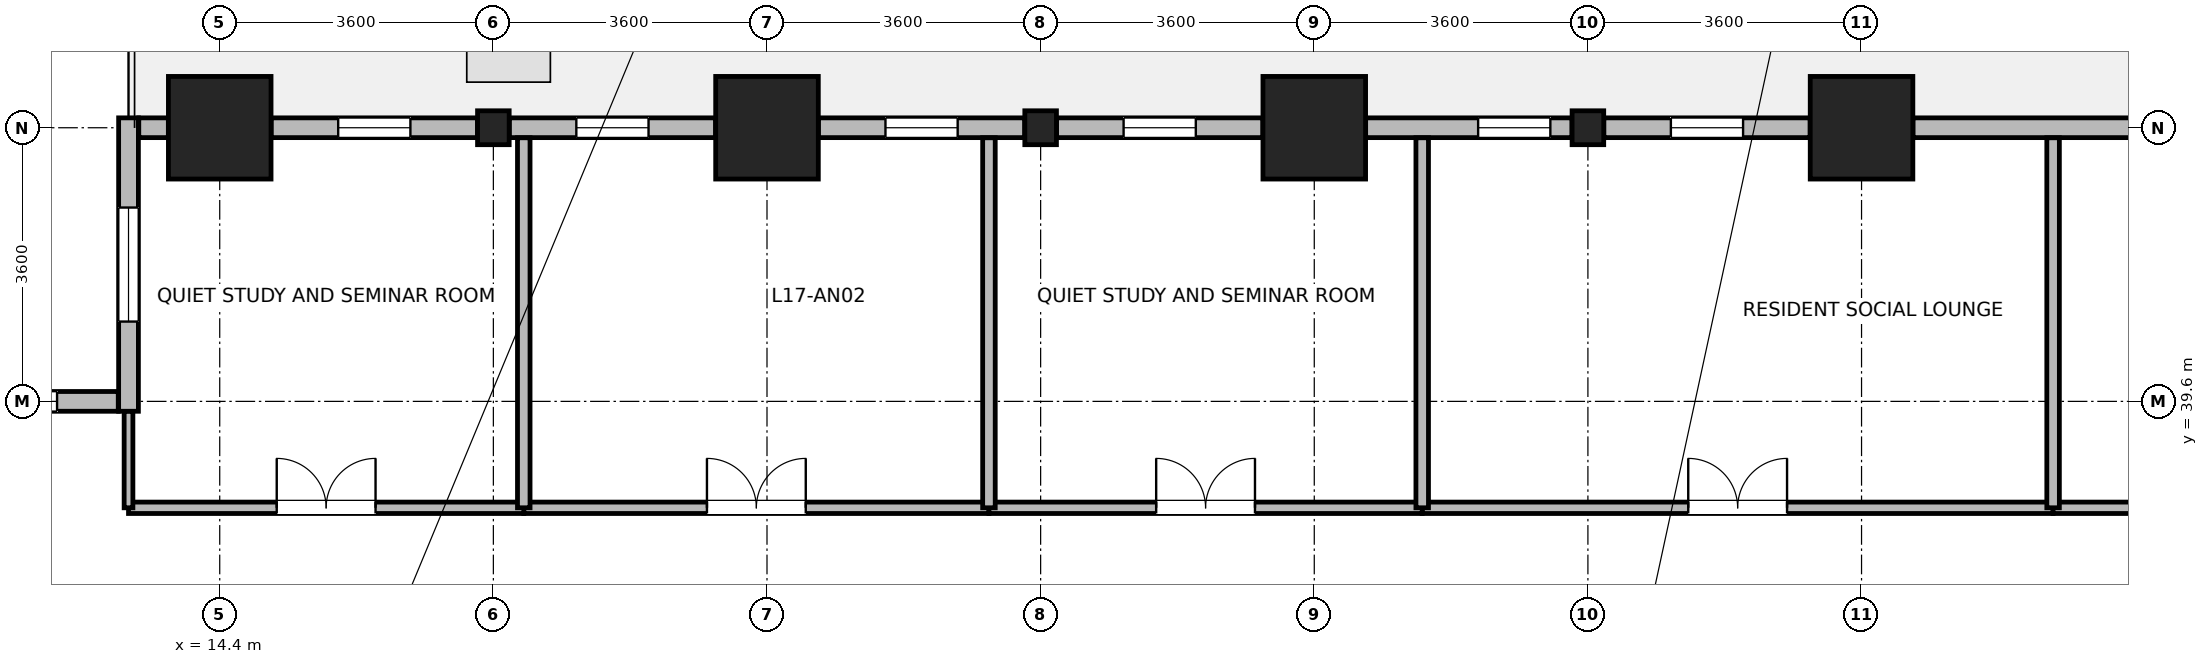
"""IFC4 building model, lengths in metres.
Left out: names, types, materials, properties, quantities, classifications, styles, units other than length and angle.
Written with IfcOpenShell. Run it as: python <this file> out.ifc"""

import sys

from ifc_helpers import new_model, si_unit, direction, frame, frame_2d, origin, origin_2d, place, context, subcontext, project, spatial, rectangle, i_section, extrude, source, transform, mapped, element, fill, save


model = new_model("IFC4")
c1 = context("Model", 3, precision=1e-05, world=origin(), true_north=direction((0.0, 1.0)))
c2 = subcontext(c1, "Body", "Model", "MODEL_VIEW")
j1 = project(units=[si_unit("LENGTHUNIT", "METRE"), si_unit("PLANEANGLEUNIT", "RADIAN")], contexts=[c1])
p1 = place(None, origin())
s1 = spatial("IfcSite", under=j1, at=p1, CompositionType="ELEMENT")
p2 = place(p1, origin())
s2 = spatial("IfcBuilding", under=s1, at=p2, CompositionType="ELEMENT")
p3 = place(p2, frame((0.0, 0.0, 69.7)))
s3 = spatial("IfcBuildingStorey", under=s2, at=p3, CompositionType="ELEMENT", Elevation=69.7)
m1 = source(origin(), c2, "Body", "SweptSolid", [
    extrude(rectangle(XDim=1.35, YDim=1.35, at=origin_2d()), origin(), (0.0, 0.0, 1.0), 3.7),
])
for number, where, z_axis, x_axis in (
    (1, (14.4, 43.2, 0.0), (0.0, 0.0, 1.0), (1.0, 0.0, 0.0)),
    (2, (21.6, 43.2, 0.0), (0.0, 0.0, 1.0), (1.0, 0.0, 0.0)),
    (3, (28.8, 43.2, 0.0), (0.0, 0.0, 1.0), (1.0, 0.0, 0.0)),
    (4, (36.0, 43.2, 0.0), (0.0, 0.0, 1.0), (1.0, 0.0, 0.0)),
):
    element("IfcColumn", number, at=place(p3, frame(where, z_axis=z_axis, x_axis=x_axis)), inside=s3, PredefinedType="COLUMN", context=c2, shape_type="MappedRepresentation", body=[
        mapped(m1, transform((0.0, 0.0, 0.0), x_axis=(1.0, 0.0, 0.0), y_axis=(0.0, 1.0, 0.0), z_axis=(0.0, 0.0, 1.0), scale=1.0)),
    ])
m2 = source(origin(), c2, "Body", "SweptSolid", [
    extrude(i_section(OverallWidth=0.416, OverallDepth=0.446, WebThickness=0.029, FlangeThickness=0.04, FilletRadius=0.015, at=origin_2d()), origin(), (0.0, 0.0, 1.0), 3.7),
])
for number, where, z_axis, x_axis in (
    (5, (18.0, 43.2, 0.0), (0.0, 0.0, 1.0), (1.0, 0.0, 0.0)),
    (6, (25.2, 43.2, 0.0), (0.0, 0.0, 1.0), (1.0, 0.0, 0.0)),
    (7, (32.4, 43.2, 0.0), (0.0, 0.0, 1.0), (1.0, 0.0, 0.0)),
):
    element("IfcColumn", number, at=place(p3, frame(where, z_axis=z_axis, x_axis=x_axis)), inside=s3, PredefinedType="COLUMN", context=c2, shape_type="MappedRepresentation", body=[
        mapped(m2, transform((0.0, 0.0, 0.0), x_axis=(1.0, 0.0, 0.0), y_axis=(0.0, 1.0, 0.0), z_axis=(0.0, 0.0, 1.0), scale=1.0)),
    ])
p4 = place(p3, frame((36.676, 43.2, 0.0), z_axis=(0.0, 0.0, 1.0), x_axis=(1.0, 0.0, 0.0)))
e8 = element("IfcWall", 8, at=p4, inside=s3, PredefinedType="STANDARD", context=c2, shape_type="SweptSolid", body=[
    extrude(rectangle(XDim=9.448, YDim=0.26, at=frame_2d((4.724, 0.0))), origin(), (0.0, 0.0, 1.0), 2.82),
])
p5 = place(p4, frame((3.974, 0.0, 0.0)))
e9 = element("IfcOpeningElement", 9, at=p5, cuts=e8, PredefinedType="OPENING", context=c2, shape_type="SweptSolid", body=[
    extrude(rectangle(XDim=1.5, YDim=2.15, at=frame_2d((0.75, 1.075))), frame((0.0, 0.14, 0.0), z_axis=(0.0, -1.0, 0.0), x_axis=(1.0, 0.0, 0.0)), (0.0, 0.0, 1.0), 0.28),
])
p6 = place(p4, frame((7.123, 0.0, 0.85)))
e10 = element("IfcOpeningElement", 10, at=p6, cuts=e8, PredefinedType="OPENING", context=c2, shape_type="SweptSolid", body=[
    extrude(rectangle(XDim=1.5, YDim=1.85, at=frame_2d((0.75, 0.925))), frame((0.0, 0.14, 0.0), z_axis=(0.0, -1.0, 0.0), x_axis=(1.0, 0.0, 0.0)), (0.0, 0.0, 1.0), 0.28),
])
p7 = place(p3, frame((32.609, 43.2, 0.0), z_axis=(0.0, 0.0, 1.0), x_axis=(1.0, 0.0, 0.0)))
e11 = element("IfcWall", 11, at=p7, inside=s3, PredefinedType="STANDARD", context=c2, shape_type="SweptSolid", body=[
    extrude(rectangle(XDim=2.715, YDim=0.26, at=frame_2d((1.357, 0.0))), origin(), (0.0, 0.0, 1.0), 2.82),
])
p8 = place(p7, frame((0.883, 0.0, 0.85)))
e12 = element("IfcOpeningElement", 12, at=p8, cuts=e11, PredefinedType="OPENING", context=c2, shape_type="SweptSolid", body=[
    extrude(rectangle(XDim=0.95, YDim=1.75, at=frame_2d((0.475, 0.875))), frame((0.0, 0.14, 0.0), z_axis=(0.0, -1.0, 0.0), x_axis=(1.0, 0.0, 0.0)), (0.0, 0.0, 1.0), 0.28),
])
p9 = place(p3, frame((29.476, 43.2, 0.0), z_axis=(0.0, 0.0, 1.0), x_axis=(1.0, 0.0, 0.0)))
e13 = element("IfcWall", 13, at=p9, inside=s3, PredefinedType="STANDARD", context=c2, shape_type="SweptSolid", body=[
    extrude(rectangle(XDim=2.715, YDim=0.26, at=frame_2d((1.357, 0.0))), origin(), (0.0, 0.0, 1.0), 2.82),
])
p10 = place(p9, frame((1.48, 0.0, 0.85)))
e14 = element("IfcOpeningElement", 14, at=p10, cuts=e13, PredefinedType="OPENING", context=c2, shape_type="SweptSolid", body=[
    extrude(rectangle(XDim=0.95, YDim=1.75, at=frame_2d((0.475, 0.875))), frame((0.0, 0.14, 0.0), z_axis=(0.0, -1.0, 0.0), x_axis=(1.0, 0.0, 0.0)), (0.0, 0.0, 1.0), 0.28),
])
p11 = place(p3, frame((25.409, 43.2, 0.0), z_axis=(0.0, 0.0, 1.0), x_axis=(1.0, 0.0, 0.0)))
e15 = element("IfcWall", 15, at=p11, inside=s3, PredefinedType="STANDARD", context=c2, shape_type="SweptSolid", body=[
    extrude(rectangle(XDim=2.715, YDim=0.26, at=frame_2d((1.357, 0.0))), origin(), (0.0, 0.0, 1.0), 2.82),
])
p12 = place(p11, frame((0.883, 0.0, 0.85)))
e16 = element("IfcOpeningElement", 16, at=p12, cuts=e15, PredefinedType="OPENING", context=c2, shape_type="SweptSolid", body=[
    extrude(rectangle(XDim=0.95, YDim=1.75, at=frame_2d((0.475, 0.875))), frame((0.0, 0.14, 0.0), z_axis=(0.0, -1.0, 0.0), x_axis=(1.0, 0.0, 0.0)), (0.0, 0.0, 1.0), 0.28),
])
p13 = place(p3, frame((22.276, 43.2, 0.0), z_axis=(0.0, 0.0, 1.0), x_axis=(1.0, 0.0, 0.0)))
e17 = element("IfcWall", 17, at=p13, inside=s3, PredefinedType="STANDARD", context=c2, shape_type="SweptSolid", body=[
    extrude(rectangle(XDim=2.715, YDim=0.26, at=frame_2d((1.357, 0.0))), origin(), (0.0, 0.0, 1.0), 2.82),
])
p14 = place(p13, frame((0.883, 0.0, 0.85)))
e18 = element("IfcOpeningElement", 18, at=p14, cuts=e17, PredefinedType="OPENING", context=c2, shape_type="SweptSolid", body=[
    extrude(rectangle(XDim=0.95, YDim=1.75, at=frame_2d((0.475, 0.875))), frame((0.0, 0.14, 0.0), z_axis=(0.0, -1.0, 0.0), x_axis=(1.0, 0.0, 0.0)), (0.0, 0.0, 1.0), 0.28),
])
p15 = place(p3, frame((18.209, 43.2, 0.0), z_axis=(0.0, 0.0, 1.0), x_axis=(1.0, 0.0, 0.0)))
e19 = element("IfcWall", 19, at=p15, inside=s3, PredefinedType="STANDARD", context=c2, shape_type="SweptSolid", body=[
    extrude(rectangle(XDim=2.715, YDim=0.26, at=frame_2d((1.357, 0.0))), origin(), (0.0, 0.0, 1.0), 2.82),
])
p16 = place(p15, frame((0.883, 0.0, 0.85)))
e20 = element("IfcOpeningElement", 20, at=p16, cuts=e19, PredefinedType="OPENING", context=c2, shape_type="SweptSolid", body=[
    extrude(rectangle(XDim=0.95, YDim=1.75, at=frame_2d((0.475, 0.875))), frame((0.0, 0.14, 0.0), z_axis=(0.0, -1.0, 0.0), x_axis=(1.0, 0.0, 0.0)), (0.0, 0.0, 1.0), 0.28),
])
p17 = place(p3, frame((15.076, 43.2, 0.0), z_axis=(0.0, 0.0, 1.0), x_axis=(1.0, 0.0, 0.0)))
e21 = element("IfcWall", 21, at=p17, inside=s3, PredefinedType="STANDARD", context=c2, shape_type="SweptSolid", body=[
    extrude(rectangle(XDim=2.715, YDim=0.26, at=frame_2d((1.357, 0.0))), origin(), (0.0, 0.0, 1.0), 2.82),
])
p18 = place(p17, frame((0.883, 0.0, 0.85)))
e22 = element("IfcOpeningElement", 22, at=p18, cuts=e21, PredefinedType="OPENING", context=c2, shape_type="SweptSolid", body=[
    extrude(rectangle(XDim=0.95, YDim=1.75, at=frame_2d((0.475, 0.875))), frame((0.0, 0.14, 0.0), z_axis=(0.0, -1.0, 0.0), x_axis=(1.0, 0.0, 0.0)), (0.0, 0.0, 1.0), 0.28),
])
p19 = place(p3, frame((13.335, 43.2, 0.0), z_axis=(0.0, 0.0, 1.0), x_axis=(1.0, 0.0, 0.0)))
e23 = element("IfcWall", 23, at=p19, inside=s3, PredefinedType="STANDARD", context=c2, shape_type="SweptSolid", body=[
    extrude(rectangle(XDim=0.389, YDim=0.26, at=frame_2d((0.195, 0.0))), origin(), (0.0, 0.0, 1.0), 3.32),
])
p20 = place(p3, frame((13.2, 39.47, 0.0), z_axis=(0.0, 0.0, 1.0), x_axis=(0.0, 1.0, 0.0)))
e24 = element("IfcWall", 24, at=p20, inside=s3, PredefinedType="STANDARD", context=c2, shape_type="SweptSolid", body=[
    extrude(rectangle(XDim=3.86, YDim=0.26, at=frame_2d((1.93, 0.0))), origin(), (0.0, 0.0, 1.0), 3.32),
])
p21 = place(p20, frame((1.18, 0.0, 0.85)))
e25 = element("IfcOpeningElement", 25, at=p21, cuts=e24, PredefinedType="OPENING", context=c2, shape_type="SweptSolid", body=[
    extrude(rectangle(XDim=1.5, YDim=1.85, at=frame_2d((0.75, 0.925))), frame((0.0, 0.14, 0.0), z_axis=(0.0, -1.0, 0.0), x_axis=(1.0, 0.0, 0.0)), (0.0, 0.0, 1.0), 0.28),
])
p22 = place(p3, frame((3.735, 39.6, 0.0), z_axis=(0.0, 0.0, 1.0), x_axis=(1.0, 0.0, 0.0)))
e26 = element("IfcWall", 26, at=p22, inside=s3, PredefinedType="STANDARD", context=c2, shape_type="SweptSolid", body=[
    extrude(rectangle(XDim=9.33, YDim=0.26, at=frame_2d((4.665, 0.0))), origin(), (0.0, 0.0, 1.0), 3.32),
])
p23 = place(p22, frame((0.805, 0.0, 0.85)))
e27 = element("IfcOpeningElement", 27, at=p23, cuts=e26, PredefinedType="OPENING", context=c2, shape_type="SweptSolid", body=[
    extrude(rectangle(XDim=1.5, YDim=1.85, at=frame_2d((0.75, 0.925))), frame((0.0, 0.14, 0.0), z_axis=(0.0, -1.0, 0.0), x_axis=(1.0, 0.0, 0.0)), (0.0, 0.0, 1.0), 0.28),
])
p24 = place(p22, frame((3.915, 0.0, 0.85)))
e28 = element("IfcOpeningElement", 28, at=p24, cuts=e26, PredefinedType="OPENING", context=c2, shape_type="SweptSolid", body=[
    extrude(rectangle(XDim=1.5, YDim=1.85, at=frame_2d((0.75, 0.925))), frame((0.0, 0.14, 0.0), z_axis=(0.0, -1.0, 0.0), x_axis=(1.0, 0.0, 0.0)), (0.0, 0.0, 1.0), 0.28),
])
p25 = place(p22, frame((7.025, 0.0, 0.85)))
e29 = element("IfcOpeningElement", 29, at=p25, cuts=e26, PredefinedType="OPENING", context=c2, shape_type="SweptSolid", body=[
    extrude(rectangle(XDim=1.5, YDim=1.85, at=frame_2d((0.75, 0.925))), frame((0.0, 0.14, 0.0), z_axis=(0.0, -1.0, 0.0), x_axis=(1.0, 0.0, 0.0)), (0.0, 0.0, 1.0), 0.28),
])
p26 = place(p3, frame((30.22, 38.2, 0.0), z_axis=(0.0, 0.0, 1.0), x_axis=(1.0, 0.0, 0.0)))
e30 = element("IfcWall", 30, at=p26, inside=s3, PredefinedType="PARTITIONING", context=c2, shape_type="SweptSolid", body=[
    extrude(rectangle(XDim=8.3, YDim=0.15, at=frame_2d((4.15, 0.0))), origin(), (0.0, 0.0, 1.0), 3.32),
])
p27 = place(p26, frame((3.5, 0.0, 0.0)))
e31 = element("IfcOpeningElement", 31, at=p27, cuts=e30, PredefinedType="OPENING", context=c2, shape_type="SweptSolid", body=[
    extrude(rectangle(XDim=1.3, YDim=2.12, at=frame_2d((0.65, 1.06))), frame((0.0, 0.085, 0.0), z_axis=(0.0, -1.0, 0.0), x_axis=(1.0, 0.0, 0.0)), (0.0, 0.0, 1.0), 0.17),
])
p28 = place(p3, frame((38.52, 38.2, 0.0), z_axis=(0.0, 0.0, 1.0), x_axis=(1.0, 0.0, 0.0)))
e32 = element("IfcWall", 32, at=p28, inside=s3, PredefinedType="PARTITIONING", context=c2, shape_type="SweptSolid", body=[
    extrude(rectangle(XDim=7.64, YDim=0.15, at=frame_2d((3.82, 0.0))), origin(), (0.0, 0.0, 1.0), 3.32),
])
p29 = place(p28, frame((3.37, 0.0, 0.0)))
e33 = element("IfcOpeningElement", 33, at=p29, cuts=e32, PredefinedType="OPENING", context=c2, shape_type="SweptSolid", body=[
    extrude(rectangle(XDim=0.9, YDim=2.08, at=frame_2d((0.45, 1.04))), frame((0.0, 0.085, 0.0), z_axis=(0.0, -1.0, 0.0), x_axis=(1.0, 0.0, 0.0)), (0.0, 0.0, 1.0), 0.17),
])
p30 = place(p3, frame((18.4, 38.2, 0.0), z_axis=(0.0, 0.0, 1.0), x_axis=(1.0, 0.0, 0.0)))
e34 = element("IfcWall", 34, at=p30, inside=s3, PredefinedType="PARTITIONING", context=c2, shape_type="SweptSolid", body=[
    extrude(rectangle(XDim=6.12, YDim=0.15, at=frame_2d((3.06, 0.0))), origin(), (0.0, 0.0, 1.0), 3.32),
])
p31 = place(p30, frame((2.41, 0.0, 0.0)))
e35 = element("IfcOpeningElement", 35, at=p31, cuts=e34, PredefinedType="OPENING", context=c2, shape_type="SweptSolid", body=[
    extrude(rectangle(XDim=1.3, YDim=2.12, at=frame_2d((0.65, 1.06))), frame((0.0, 0.085, 0.0), z_axis=(0.0, -1.0, 0.0), x_axis=(1.0, 0.0, 0.0)), (0.0, 0.0, 1.0), 0.17),
])
p32 = place(p3, frame((24.52, 38.2, 0.0), z_axis=(0.0, 0.0, 1.0), x_axis=(1.0, 0.0, 0.0)))
e36 = element("IfcWall", 36, at=p32, inside=s3, PredefinedType="PARTITIONING", context=c2, shape_type="SweptSolid", body=[
    extrude(rectangle(XDim=5.7, YDim=0.15, at=frame_2d((2.85, 0.0))), origin(), (0.0, 0.0, 1.0), 3.32),
])
p33 = place(p32, frame((2.2, 0.0, 0.0)))
e37 = element("IfcOpeningElement", 37, at=p33, cuts=e36, PredefinedType="OPENING", context=c2, shape_type="SweptSolid", body=[
    extrude(rectangle(XDim=1.3, YDim=2.12, at=frame_2d((0.65, 1.06))), frame((0.0, 0.085, 0.0), z_axis=(0.0, -1.0, 0.0), x_axis=(1.0, 0.0, 0.0)), (0.0, 0.0, 1.0), 0.17),
])
p34 = place(p3, frame((13.2, 38.2, 0.0), z_axis=(0.0, 0.0, 1.0), x_axis=(1.0, 0.0, 0.0)))
e38 = element("IfcWall", 38, at=p34, inside=s3, PredefinedType="PARTITIONING", context=c2, shape_type="SweptSolid", body=[
    extrude(rectangle(XDim=5.2, YDim=0.15, at=frame_2d((2.6, 0.0))), origin(), (0.0, 0.0, 1.0), 3.32),
])
p35 = place(p34, frame((1.95, 0.0, 0.0)))
e39 = element("IfcOpeningElement", 39, at=p35, cuts=e38, PredefinedType="OPENING", context=c2, shape_type="SweptSolid", body=[
    extrude(rectangle(XDim=1.3, YDim=2.12, at=frame_2d((0.65, 1.06))), frame((0.0, 0.085, 0.0), z_axis=(0.0, -1.0, 0.0), x_axis=(1.0, 0.0, 0.0)), (0.0, 0.0, 1.0), 0.17),
])
p36 = place(p3, frame((13.2, 38.2, 0.0), z_axis=(0.0, 0.0, 1.0), x_axis=(0.0, 1.0, 0.0)))
e40 = element("IfcWall", 40, at=p36, inside=s3, PredefinedType="PARTITIONING", context=c2, shape_type="SweptSolid", body=[
    extrude(rectangle(XDim=1.268, YDim=0.115, at=frame_2d((0.634, 0.0))), origin(), (0.0, 0.0, 1.0), 3.32),
])
for number, where, z_axis, x_axis in (
    (41, (18.4, 38.2, 0.0), (0.0, 0.0, 1.0), (0.0, 1.0, 0.0)),
    (42, (24.52, 38.2, 0.0), (0.0, 0.0, 1.0), (0.0, 1.0, 0.0)),
    (43, (30.22, 38.2, 0.0), (0.0, 0.0, 1.0), (0.0, 1.0, 0.0)),
    (44, (38.52, 38.2, 0.0), (0.0, 0.0, 1.0), (0.0, 1.0, 0.0)),
):
    element("IfcWall", number, at=place(p3, frame(where, z_axis=z_axis, x_axis=x_axis)), inside=s3, PredefinedType="PARTITIONING", context=c2, shape_type="SweptSolid", body=[
        extrude(rectangle(XDim=4.868, YDim=0.165, at=frame_2d((2.434, 0.0))), origin(), (0.0, 0.0, 1.0), 3.32),
    ])
p37 = place(p8, origin())
e45 = element("IfcWindow", 45, at=p37, inside=s3, PartitioningType="SINGLE_PANEL", PredefinedType="WINDOW", context=c2, shape_type="SweptSolid", body=[
    extrude(rectangle(XDim=0.95, YDim=1.75, at=frame_2d((0.475, 0.875))), frame((0.0, 0.03, 0.0), z_axis=(0.0, -1.0, 0.0), x_axis=(1.0, 0.0, 0.0)), (0.0, 0.0, 1.0), 0.06),
])
fill(e12, e45)
p38 = place(p10, origin())
e46 = element("IfcWindow", 46, at=p38, inside=s3, PartitioningType="SINGLE_PANEL", PredefinedType="WINDOW", context=c2, shape_type="SweptSolid", body=[
    extrude(rectangle(XDim=0.95, YDim=1.75, at=frame_2d((0.475, 0.875))), frame((0.0, 0.03, 0.0), z_axis=(0.0, -1.0, 0.0), x_axis=(1.0, 0.0, 0.0)), (0.0, 0.0, 1.0), 0.06),
])
fill(e14, e46)
p39 = place(p12, origin())
e47 = element("IfcWindow", 47, at=p39, inside=s3, PartitioningType="SINGLE_PANEL", PredefinedType="WINDOW", context=c2, shape_type="SweptSolid", body=[
    extrude(rectangle(XDim=0.95, YDim=1.75, at=frame_2d((0.475, 0.875))), frame((0.0, 0.03, 0.0), z_axis=(0.0, -1.0, 0.0), x_axis=(1.0, 0.0, 0.0)), (0.0, 0.0, 1.0), 0.06),
])
fill(e16, e47)
p40 = place(p14, origin())
e48 = element("IfcWindow", 48, at=p40, inside=s3, PartitioningType="SINGLE_PANEL", PredefinedType="WINDOW", context=c2, shape_type="SweptSolid", body=[
    extrude(rectangle(XDim=0.95, YDim=1.75, at=frame_2d((0.475, 0.875))), frame((0.0, 0.03, 0.0), z_axis=(0.0, -1.0, 0.0), x_axis=(1.0, 0.0, 0.0)), (0.0, 0.0, 1.0), 0.06),
])
fill(e18, e48)
p41 = place(p16, origin())
e49 = element("IfcWindow", 49, at=p41, inside=s3, PartitioningType="SINGLE_PANEL", PredefinedType="WINDOW", context=c2, shape_type="SweptSolid", body=[
    extrude(rectangle(XDim=0.95, YDim=1.75, at=frame_2d((0.475, 0.875))), frame((0.0, 0.03, 0.0), z_axis=(0.0, -1.0, 0.0), x_axis=(1.0, 0.0, 0.0)), (0.0, 0.0, 1.0), 0.06),
])
fill(e20, e49)
p42 = place(p18, origin())
e50 = element("IfcWindow", 50, at=p42, inside=s3, PartitioningType="SINGLE_PANEL", PredefinedType="WINDOW", context=c2, shape_type="SweptSolid", body=[
    extrude(rectangle(XDim=0.95, YDim=1.75, at=frame_2d((0.475, 0.875))), frame((0.0, 0.03, 0.0), z_axis=(0.0, -1.0, 0.0), x_axis=(1.0, 0.0, 0.0)), (0.0, 0.0, 1.0), 0.06),
])
fill(e22, e50)
p43 = place(p21, origin())
e51 = element("IfcWindow", 51, at=p43, inside=s3, PartitioningType="SINGLE_PANEL", PredefinedType="WINDOW", context=c2, shape_type="SweptSolid", body=[
    extrude(rectangle(XDim=1.5, YDim=1.85, at=frame_2d((0.75, 0.925))), frame((0.0, 0.03, 0.0), z_axis=(0.0, -1.0, 0.0), x_axis=(1.0, 0.0, 0.0)), (0.0, 0.0, 1.0), 0.06),
])
fill(e25, e51)
p44 = place(p25, origin())
e52 = element("IfcWindow", 52, at=p44, inside=s3, PartitioningType="SINGLE_PANEL", PredefinedType="WINDOW", context=c2, shape_type="SweptSolid", body=[
    extrude(rectangle(XDim=1.5, YDim=1.85, at=frame_2d((0.75, 0.925))), frame((0.0, 0.03, 0.0), z_axis=(0.0, -1.0, 0.0), x_axis=(1.0, 0.0, 0.0)), (0.0, 0.0, 1.0), 0.06),
])
fill(e29, e52)
p45 = place(p27, origin())
e53 = element("IfcDoor", 53, at=p45, inside=s3, OperationType="DOUBLE_DOOR_SINGLE_SWING", PredefinedType="DOOR", context=c2, shape_type="SweptSolid", body=[
    extrude(rectangle(XDim=1.3, YDim=2.12, at=frame_2d((0.65, 1.06))), frame((0.0, 0.025, 0.0), z_axis=(0.0, -1.0, 0.0), x_axis=(1.0, 0.0, 0.0)), (0.0, 0.0, 1.0), 0.05),
])
fill(e31, e53)
p46 = place(p31, origin())
e54 = element("IfcDoor", 54, at=p46, inside=s3, OperationType="DOUBLE_DOOR_SINGLE_SWING", PredefinedType="DOOR", context=c2, shape_type="SweptSolid", body=[
    extrude(rectangle(XDim=1.3, YDim=2.12, at=frame_2d((0.65, 1.06))), frame((0.0, 0.025, 0.0), z_axis=(0.0, -1.0, 0.0), x_axis=(1.0, 0.0, 0.0)), (0.0, 0.0, 1.0), 0.05),
])
fill(e35, e54)
p47 = place(p33, origin())
e55 = element("IfcDoor", 55, at=p47, inside=s3, OperationType="DOUBLE_DOOR_SINGLE_SWING", PredefinedType="DOOR", context=c2, shape_type="SweptSolid", body=[
    extrude(rectangle(XDim=1.3, YDim=2.12, at=frame_2d((0.65, 1.06))), frame((0.0, 0.025, 0.0), z_axis=(0.0, -1.0, 0.0), x_axis=(1.0, 0.0, 0.0)), (0.0, 0.0, 1.0), 0.05),
])
fill(e37, e55)
p48 = place(p35, origin())
e56 = element("IfcDoor", 56, at=p48, inside=s3, OperationType="DOUBLE_DOOR_SINGLE_SWING", PredefinedType="DOOR", context=c2, shape_type="SweptSolid", body=[
    extrude(rectangle(XDim=1.3, YDim=2.12, at=frame_2d((0.65, 1.06))), frame((0.0, 0.025, 0.0), z_axis=(0.0, -1.0, 0.0), x_axis=(1.0, 0.0, 0.0)), (0.0, 0.0, 1.0), 0.05),
])
fill(e39, e56)
save(model, sys.argv[1])
